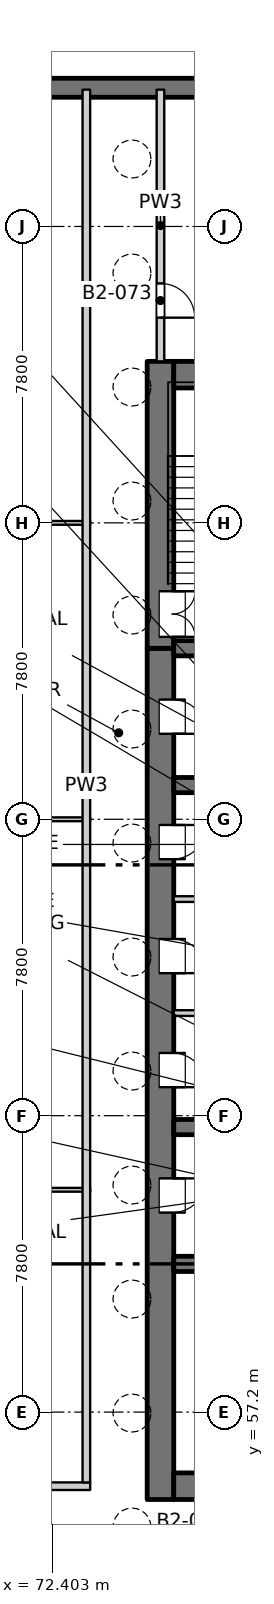
"""IFC4 building model, lengths in metres.
Left out: names, types, materials, properties, quantities, classifications, styles, units other than length and angle.
Written with IfcOpenShell. Run it as: python <this file> out.ifc"""

import sys

from ifc_helpers import new_model, si_unit, direction, frame, frame_2d, origin, place, context, subcontext, project, spatial, rectangle, extrude, element, fill, save


model = new_model("IFC4")
c1 = context("Model", 3, precision=1e-05, world=origin(), true_north=direction((0.0, 1.0)))
c2 = subcontext(c1, "Body", "Model", "MODEL_VIEW")
j1 = project(units=[si_unit("LENGTHUNIT", "METRE"), si_unit("PLANEANGLEUNIT", "RADIAN")], contexts=[c1])
p1 = place(None, origin())
s1 = spatial("IfcSite", under=j1, at=p1, CompositionType="ELEMENT")
p2 = place(p1, origin())
s2 = spatial("IfcBuilding", under=s1, at=p2, CompositionType="ELEMENT")
p3 = place(p2, frame((0.0, 0.0, -9.0)))
s3 = spatial("IfcBuildingStorey", under=s2, at=p3, CompositionType="ELEMENT", Elevation=-9.0)
p4 = place(p3, frame((42.6, 92.05, -0.5), z_axis=(0.0, 0.0, 1.0), x_axis=(1.0, 0.0, 0.0)))
e1 = element("IfcWall", 1, at=p4, inside=s3, PredefinedType="SOLIDWALL", context=c2, shape_type="SweptSolid", body=[
    extrude(rectangle(XDim=84.8, YDim=0.5, at=frame_2d((42.4, 0.0))), origin(), (0.0, 0.0, 1.0), 4.65),
])
p5 = place(p3, frame((75.25, 54.9, -0.5), z_axis=(0.0, 0.0, 1.0), x_axis=(0.0, 1.0, 0.0)))
e2 = element("IfcWall", 2, at=p5, inside=s3, PredefinedType="SOLIDWALL", context=c2, shape_type="SweptSolid", body=[
    extrude(rectangle(XDim=22.4, YDim=0.7, at=frame_2d((11.2, 0.0))), origin(), (0.0, 0.0, 1.0), 4.65),
])
p6 = place(p5, frame((7.55, 0.0, 0.5)))
e3 = element("IfcOpeningElement", 3, at=p6, cuts=e2, PredefinedType="OPENING", context=c2, shape_type="SweptSolid", body=[
    extrude(rectangle(XDim=0.9, YDim=2.1, at=frame_2d((0.45, 1.05))), frame((0.0, 0.36, 0.0), z_axis=(0.0, -1.0, 0.0), x_axis=(1.0, 0.0, 0.0)), (0.0, 0.0, 1.0), 0.72),
])
p7 = place(p5, frame((10.85, 0.0, 0.5)))
e4 = element("IfcOpeningElement", 4, at=p7, cuts=e2, PredefinedType="OPENING", context=c2, shape_type="SweptSolid", body=[
    extrude(rectangle(XDim=0.9, YDim=2.1, at=frame_2d((0.45, 1.05))), frame((0.0, 0.36, 0.0), z_axis=(0.0, -1.0, 0.0), x_axis=(1.0, 0.0, 0.0)), (0.0, 0.0, 1.0), 0.72),
])
p8 = place(p5, frame((13.85, 0.0, 0.5)))
e5 = element("IfcOpeningElement", 5, at=p8, cuts=e2, PredefinedType="OPENING", context=c2, shape_type="SweptSolid", body=[
    extrude(rectangle(XDim=0.9, YDim=2.1, at=frame_2d((0.45, 1.05))), frame((0.0, 0.36, 0.0), z_axis=(0.0, -1.0, 0.0), x_axis=(1.0, 0.0, 0.0)), (0.0, 0.0, 1.0), 0.72),
])
p9 = place(p5, frame((16.85, 0.0, 0.5)))
e6 = element("IfcOpeningElement", 6, at=p9, cuts=e2, PredefinedType="OPENING", context=c2, shape_type="SweptSolid", body=[
    extrude(rectangle(XDim=0.9, YDim=2.1, at=frame_2d((0.45, 1.05))), frame((0.0, 0.36, 0.0), z_axis=(0.0, -1.0, 0.0), x_axis=(1.0, 0.0, 0.0)), (0.0, 0.0, 1.0), 0.72),
])
p10 = place(p5, frame((20.15, 0.0, 0.5)))
e7 = element("IfcOpeningElement", 7, at=p10, cuts=e2, PredefinedType="OPENING", context=c2, shape_type="SweptSolid", body=[
    extrude(rectangle(XDim=0.9, YDim=2.1, at=frame_2d((0.45, 1.05))), frame((0.0, 0.36, 0.0), z_axis=(0.0, -1.0, 0.0), x_axis=(1.0, 0.0, 0.0)), (0.0, 0.0, 1.0), 0.72),
])
p11 = place(p3, frame((75.25, 77.3, -0.5), z_axis=(0.0, 0.0, 1.0), x_axis=(0.0, 1.0, 0.0)))
e8 = element("IfcWall", 8, at=p11, inside=s3, PredefinedType="SOLIDWALL", context=c2, shape_type="SweptSolid", body=[
    extrude(rectangle(XDim=7.55, YDim=0.7, at=frame_2d((3.775, 0.0))), origin(), (0.0, 0.0, 1.0), 4.65),
])
p12 = place(p11, frame((0.3, 0.0, 0.5)))
e9 = element("IfcOpeningElement", 9, at=p12, cuts=e8, PredefinedType="OPENING", context=c2, shape_type="SweptSolid", body=[
    extrude(rectangle(XDim=1.2, YDim=2.1, at=frame_2d((0.6, 1.05))), frame((0.0, 0.36, 0.0), z_axis=(0.0, -1.0, 0.0), x_axis=(1.0, 0.0, 0.0)), (0.0, 0.0, 1.0), 0.72),
])
p13 = place(p3, frame((75.6, 55.25, -0.5), z_axis=(0.0, 0.0, 1.0), x_axis=(1.0, 0.0, 0.0)))
e10 = element("IfcWall", 10, at=p13, inside=s3, PredefinedType="SOLIDWALL", context=c2, shape_type="SweptSolid", body=[
    extrude(rectangle(XDim=18.8, YDim=0.7, at=frame_2d((9.4, 0.0))), origin(), (0.0, 0.0, 1.0), 4.65),
])
p14 = place(p13, frame((8.65, 0.0, 0.5)))
e11 = element("IfcOpeningElement", 11, at=p14, cuts=e10, PredefinedType="OPENING", context=c2, shape_type="SweptSolid", body=[
    extrude(rectangle(XDim=1.5, YDim=2.1, at=frame_2d((0.75, 1.05))), frame((0.0, 0.36, 0.0), z_axis=(0.0, -1.0, 0.0), x_axis=(1.0, 0.0, 0.0)), (0.0, 0.0, 1.0), 0.72),
])
p15 = place(p3, frame((75.6, 84.5, -0.5), z_axis=(0.0, 0.0, 1.0), x_axis=(1.0, 0.0, 0.0)))
e12 = element("IfcWall", 12, at=p15, inside=s3, PredefinedType="SOLIDWALL", context=c2, shape_type="SweptSolid", body=[
    extrude(rectangle(XDim=18.8, YDim=0.7, at=frame_2d((9.4, 0.0))), origin(), (0.0, 0.0, 1.0), 4.65),
])
for number, where, z_axis, x_axis in (
    (13, (75.6, 61.1, -0.5), (0.0, 0.0, 1.0), (1.0, 0.0, 0.0)),
    (14, (75.6, 64.7, -0.5), (0.0, 0.0, 1.0), (1.0, 0.0, 0.0)),
    (15, (75.6, 73.7, -0.5), (0.0, 0.0, 1.0), (1.0, 0.0, 0.0)),
    (16, (75.6, 77.3, -0.5), (0.0, 0.0, 1.0), (1.0, 0.0, 0.0)),
):
    element("IfcWall", number, at=place(p3, frame(where, z_axis=z_axis, x_axis=x_axis)), inside=s3, PredefinedType="SOLIDWALL", context=c2, shape_type="SweptSolid", body=[
        extrude(rectangle(XDim=3.65, YDim=0.4, at=frame_2d((1.825, 0.0))), origin(), (0.0, 0.0, 1.0), 4.65),
    ])
p16 = place(p3, frame((59.55, 55.25, 0.0), z_axis=(0.0, 0.0, 1.0), x_axis=(1.0, 0.0, 0.0)))
e17 = element("IfcWall", 17, at=p16, inside=s3, PredefinedType="PARTITIONING", context=c2, shape_type="SweptSolid", body=[
    extrude(rectangle(XDim=13.85, YDim=0.2, at=frame_2d((6.925, 0.0))), origin(), (0.0, 0.0, 1.0), 4.15),
])
p17 = place(p3, frame((59.55, 63.05, 0.0), z_axis=(0.0, 0.0, 1.0), x_axis=(1.0, 0.0, 0.0)))
e18 = element("IfcWall", 18, at=p17, inside=s3, PredefinedType="PARTITIONING", context=c2, shape_type="SweptSolid", body=[
    extrude(rectangle(XDim=13.85, YDim=0.1, at=frame_2d((6.925, 0.0))), origin(), (0.0, 0.0, 1.0), 4.15),
])
for number, where, z_axis, x_axis in (
    (19, (75.6, 67.7, 0.0), (0.0, 0.0, 1.0), (1.0, 0.0, 0.0)),
    (20, (75.6, 70.7, 0.0), (0.0, 0.0, 1.0), (1.0, 0.0, 0.0)),
):
    element("IfcWall", number, at=place(p3, frame(where, z_axis=z_axis, x_axis=x_axis)), inside=s3, PredefinedType="PARTITIONING", context=c2, shape_type="SweptSolid", body=[
        extrude(rectangle(XDim=3.65, YDim=0.15, at=frame_2d((1.825, 0.0))), origin(), (0.0, 0.0, 1.0), 4.15),
    ])
for number, where, z_axis, x_axis in (
    (21, (59.55, 72.8, 0.0), (0.0, 0.0, 1.0), (1.0, 0.0, 0.0)),
    (22, (59.55, 80.6, 0.0), (0.0, 0.0, 1.0), (1.0, 0.0, 0.0)),
):
    element("IfcWall", number, at=place(p3, frame(where, z_axis=z_axis, x_axis=x_axis)), inside=s3, PredefinedType="PARTITIONING", context=c2, shape_type="SweptSolid", body=[
        extrude(rectangle(XDim=13.85, YDim=0.1, at=frame_2d((6.925, 0.0))), origin(), (0.0, 0.0, 1.0), 4.15),
    ])
p18 = place(p3, frame((73.3, 55.35, 0.0), z_axis=(0.0, 0.0, 1.0), x_axis=(0.0, 1.0, 0.0)))
e23 = element("IfcWall", 23, at=p18, inside=s3, PredefinedType="PARTITIONING", context=c2, shape_type="SweptSolid", body=[
    extrude(rectangle(XDim=36.65, YDim=0.2, at=frame_2d((18.325, 0.0))), origin(), (0.0, 0.0, 1.0), 4.15),
])
p19 = place(p3, frame((75.25, 84.85, 0.0), z_axis=(0.0, 0.0, 1.0), x_axis=(0.0, 1.0, 0.0)))
e24 = element("IfcWall", 24, at=p19, inside=s3, PredefinedType="PARTITIONING", context=c2, shape_type="SweptSolid", body=[
    extrude(rectangle(XDim=7.15, YDim=0.2, at=frame_2d((3.575, 0.0))), origin(), (0.0, 0.0, 1.0), 4.15),
])
p20 = place(p19, frame((1.15, 0.0, 0.0)))
e25 = element("IfcOpeningElement", 25, at=p20, cuts=e24, PredefinedType="OPENING", context=c2, shape_type="SweptSolid", body=[
    extrude(rectangle(XDim=0.9, YDim=2.1, at=frame_2d((0.45, 1.05))), frame((0.0, 0.11, 0.0), z_axis=(0.0, -1.0, 0.0), x_axis=(1.0, 0.0, 0.0)), (0.0, 0.0, 1.0), 0.22),
])
p21 = place(p6, origin())
e26 = element("IfcDoor", 26, at=p21, inside=s3, OperationType="SINGLE_SWING_LEFT", PredefinedType="DOOR", context=c2, shape_type="SweptSolid", body=[
    extrude(rectangle(XDim=0.9, YDim=2.1, at=frame_2d((0.45, 1.05))), frame((0.0, -0.285, 0.0), z_axis=(0.0, -1.0, 0.0), x_axis=(1.0, 0.0, 0.0)), (0.0, 0.0, 1.0), 0.05),
])
fill(e3, e26)
p22 = place(p7, origin())
e27 = element("IfcDoor", 27, at=p22, inside=s3, OperationType="SINGLE_SWING_RIGHT", PredefinedType="DOOR", context=c2, shape_type="SweptSolid", body=[
    extrude(rectangle(XDim=0.9, YDim=2.1, at=frame_2d((0.45, 1.05))), frame((0.0, -0.285, 0.0), z_axis=(0.0, -1.0, 0.0), x_axis=(1.0, 0.0, 0.0)), (0.0, 0.0, 1.0), 0.05),
])
fill(e4, e27)
p23 = place(p8, origin())
e28 = element("IfcDoor", 28, at=p23, inside=s3, OperationType="SINGLE_SWING_RIGHT", PredefinedType="DOOR", context=c2, shape_type="SweptSolid", body=[
    extrude(rectangle(XDim=0.9, YDim=2.1, at=frame_2d((0.45, 1.05))), frame((0.0, -0.285, 0.0), z_axis=(0.0, -1.0, 0.0), x_axis=(1.0, 0.0, 0.0)), (0.0, 0.0, 1.0), 0.05),
])
fill(e5, e28)
p24 = place(p9, origin())
e29 = element("IfcDoor", 29, at=p24, inside=s3, OperationType="SINGLE_SWING_LEFT", PredefinedType="DOOR", context=c2, shape_type="SweptSolid", body=[
    extrude(rectangle(XDim=0.9, YDim=2.1, at=frame_2d((0.45, 1.05))), frame((0.0, -0.285, 0.0), z_axis=(0.0, -1.0, 0.0), x_axis=(1.0, 0.0, 0.0)), (0.0, 0.0, 1.0), 0.05),
])
fill(e6, e29)
p25 = place(p10, origin())
e30 = element("IfcDoor", 30, at=p25, inside=s3, OperationType="SINGLE_SWING_RIGHT", PredefinedType="DOOR", context=c2, shape_type="SweptSolid", body=[
    extrude(rectangle(XDim=0.9, YDim=2.1, at=frame_2d((0.45, 1.05))), frame((0.0, -0.285, 0.0), z_axis=(0.0, -1.0, 0.0), x_axis=(1.0, 0.0, 0.0)), (0.0, 0.0, 1.0), 0.05),
])
fill(e7, e30)
p26 = place(p12, origin())
e31 = element("IfcDoor", 31, at=p26, inside=s3, OperationType="DOUBLE_DOOR_SINGLE_SWING", PredefinedType="DOOR", context=c2, shape_type="SweptSolid", body=[
    extrude(rectangle(XDim=1.2, YDim=2.1, at=frame_2d((0.6, 1.05))), frame((0.0, -0.285, 0.0), z_axis=(0.0, -1.0, 0.0), x_axis=(1.0, 0.0, 0.0)), (0.0, 0.0, 1.0), 0.05),
])
fill(e9, e31)
p27 = place(p20, origin())
e32 = element("IfcDoor", 32, at=p27, inside=s3, OperationType="SINGLE_SWING_RIGHT", PredefinedType="DOOR", context=c2, shape_type="SweptSolid", body=[
    extrude(rectangle(XDim=0.9, YDim=2.1, at=frame_2d((0.45, 1.05))), frame((0.0, 0.025, 0.0), z_axis=(0.0, -1.0, 0.0), x_axis=(1.0, 0.0, 0.0)), (0.0, 0.0, 1.0), 0.05),
])
fill(e25, e32)
save(model, sys.argv[1])
